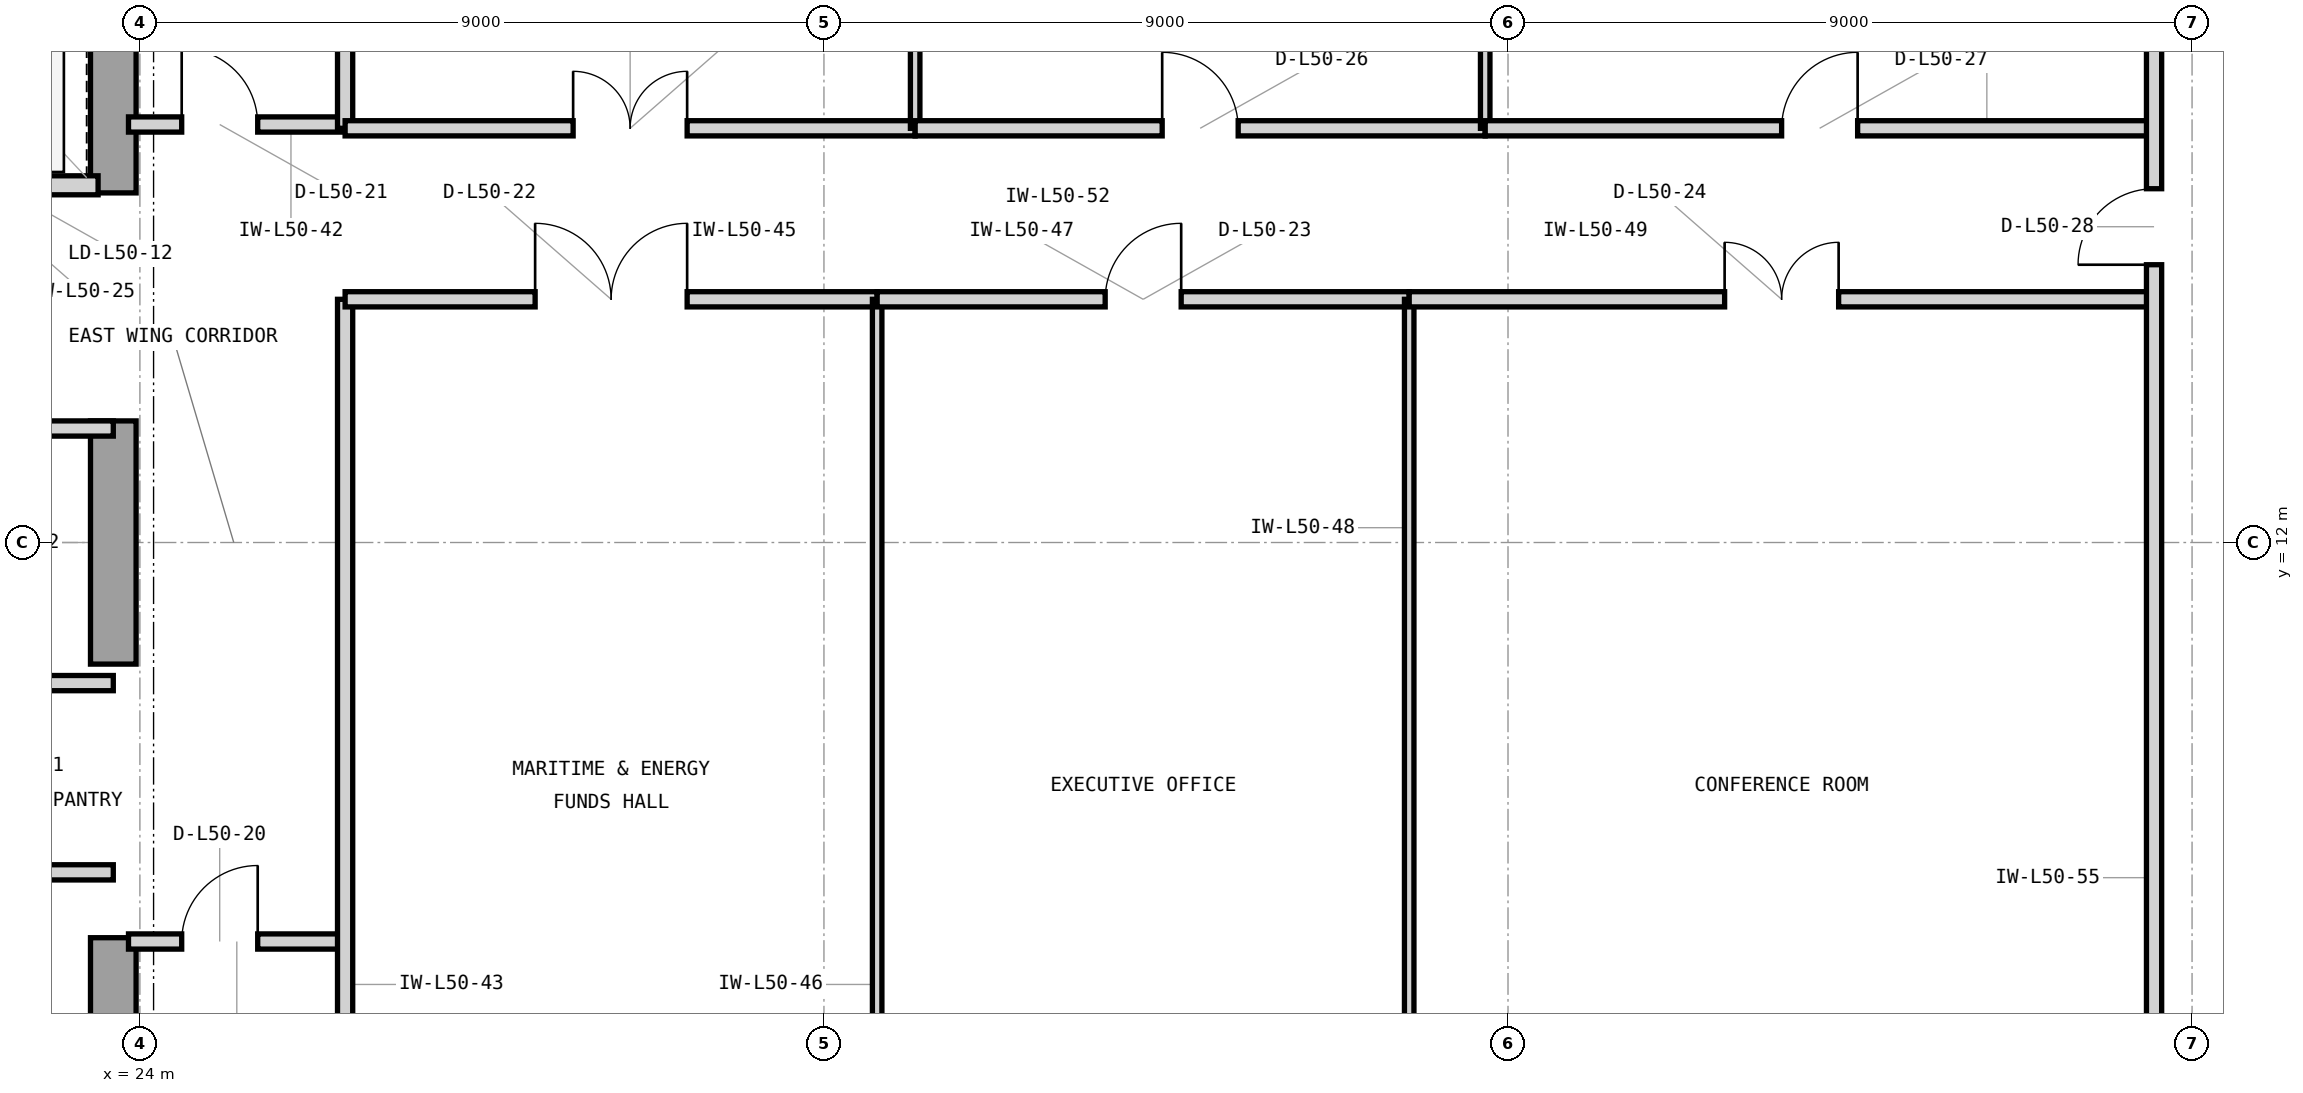
"""IFC4 building model, lengths in metres.
Left out: names, types, materials, properties, quantities, classifications, styles, units other than length and angle.
Written with IfcOpenShell. Run it as: python <this file> out.ifc"""

import sys

from ifc_helpers import new_model, si_unit, direction, frame, frame_2d, origin, place, context, subcontext, project, spatial, rectangle, extrude, element, fill, save


model = new_model("IFC4")
c1 = context("Model", 3, precision=1e-05, world=origin(), true_north=direction((0.0, 1.0)))
c2 = subcontext(c1, "Body", "Model", "MODEL_VIEW")
j1 = project(units=[si_unit("LENGTHUNIT", "METRE"), si_unit("PLANEANGLEUNIT", "RADIAN")], contexts=[c1])
p1 = place(None, origin())
s1 = spatial("IfcSite", under=j1, at=p1, CompositionType="ELEMENT")
p2 = place(p1, origin())
s2 = spatial("IfcBuilding", under=s1, at=p2, CompositionType="ELEMENT")
p3 = place(p2, frame((0.0, 0.0, 207.3)))
s3 = spatial("IfcBuildingStorey", under=s2, at=p3, CompositionType="ELEMENT", Elevation=207.3)
p4 = place(p3, frame((23.65, 3.65, 0.0), z_axis=(0.0, 0.0, 1.0), x_axis=(0.0, 1.0, 0.0)))
e1 = element("IfcWall", 1, at=p4, inside=s3, PredefinedType="SHEAR", context=c2, shape_type="SweptSolid", body=[
    extrude(rectangle(XDim=3.15, YDim=0.6, at=frame_2d((1.575, 0.0))), origin(), (0.0, 0.0, 1.0), 3.9),
])
p5 = place(p3, frame((23.65, 10.4, 0.0), z_axis=(0.0, 0.0, 1.0), x_axis=(0.0, 1.0, 0.0)))
e2 = element("IfcWall", 2, at=p5, inside=s3, PredefinedType="SHEAR", context=c2, shape_type="SweptSolid", body=[
    extrude(rectangle(XDim=3.2, YDim=0.6, at=frame_2d((1.6, 0.0))), origin(), (0.0, 0.0, 1.0), 3.9),
])
p6 = place(p3, frame((23.65, 16.6, 0.0), z_axis=(0.0, 0.0, 1.0), x_axis=(0.0, 1.0, 0.0)))
e3 = element("IfcWall", 3, at=p6, inside=s3, PredefinedType="SHEAR", context=c2, shape_type="SweptSolid", body=[
    extrude(rectangle(XDim=4.05, YDim=0.6, at=frame_2d((2.025, 0.0))), origin(), (0.0, 0.0, 1.0), 3.9),
])
p7 = place(p3, frame((21.05, 16.7, 0.0), z_axis=(0.0, 0.0, 1.0), x_axis=(1.0, 0.0, 0.0)))
e4 = element("IfcWall", 4, at=p7, inside=s3, PredefinedType="PARTITIONING", context=c2, shape_type="SweptSolid", body=[
    extrude(rectangle(XDim=2.4, YDim=0.25, at=frame_2d((1.2, 0.0))), origin(), (0.0, 0.0, 1.0), 3.283),
])
p8 = place(p7, frame((0.52, 0.0, 0.0)))
e5 = element("IfcOpeningElement", 5, at=p8, cuts=e4, PredefinedType="OPENING", context=c2, shape_type="SweptSolid", body=[
    extrude(rectangle(XDim=1.15, YDim=2.25, at=frame_2d((0.575, 1.125))), frame((0.0, 0.135, 0.0), z_axis=(0.0, -1.0, 0.0), x_axis=(1.0, 0.0, 0.0)), (0.0, 0.0, 1.0), 0.27),
])
p9 = place(p3, frame((20.8, 7.66, 0.0), z_axis=(0.0, 0.0, 1.0), x_axis=(1.0, 0.0, 0.0)))
e6 = element("IfcWall", 6, at=p9, inside=s3, PredefinedType="PARTITIONING", context=c2, shape_type="SweptSolid", body=[
    extrude(rectangle(XDim=2.85, YDim=0.2, at=frame_2d((1.425, 0.0))), origin(), (0.0, 0.0, 1.0), 3.69),
])
p10 = place(p9, frame((0.95, 0.0, 0.0)))
e7 = element("IfcOpeningElement", 7, at=p10, cuts=e6, PredefinedType="OPENING", context=c2, shape_type="SweptSolid", body=[
    extrude(rectangle(XDim=0.95, YDim=2.1, at=frame_2d((0.475, 1.05))), frame((0.0, 0.11, 0.0), z_axis=(0.0, -1.0, 0.0), x_axis=(1.0, 0.0, 0.0)), (0.0, 0.0, 1.0), 0.22),
])
p11 = place(p3, frame((14.825, 10.15, 0.0), z_axis=(0.0, 0.0, 1.0), x_axis=(1.0, 0.0, 0.0)))
e8 = element("IfcWall", 8, at=p11, inside=s3, PredefinedType="PARTITIONING", context=c2, shape_type="SweptSolid", body=[
    extrude(rectangle(XDim=8.825, YDim=0.2, at=frame_2d((4.413, 0.0))), origin(), (0.0, 0.0, 1.0), 3.69),
])
p12 = place(p3, frame((18.5, 13.5, 0.0), z_axis=(0.0, 0.0, 1.0), x_axis=(1.0, 0.0, 0.0)))
e9 = element("IfcWall", 9, at=p12, inside=s3, PredefinedType="PARTITIONING", context=c2, shape_type="SweptSolid", body=[
    extrude(rectangle(XDim=5.15, YDim=0.2, at=frame_2d((2.575, 0.0))), origin(), (0.0, 0.0, 1.0), 3.283),
])
p13 = place(p12, frame((2.1, 0.0, 0.0)))
e10 = element("IfcOpeningElement", 10, at=p13, cuts=e9, PredefinedType="OPENING", context=c2, shape_type="SweptSolid", body=[
    extrude(rectangle(XDim=0.95, YDim=2.1, at=frame_2d((0.475, 1.05))), frame((0.0, 0.11, 0.0), z_axis=(0.0, -1.0, 0.0), x_axis=(1.0, 0.0, 0.0)), (0.0, 0.0, 1.0), 0.22),
])
p14 = place(p3, frame((23.85, 6.75, 0.0), z_axis=(0.0, 0.0, 1.0), x_axis=(1.0, 0.0, 0.0)))
e11 = element("IfcWall", 11, at=p14, inside=s3, PredefinedType="PARTITIONING", context=c2, shape_type="SweptSolid", body=[
    extrude(rectangle(XDim=2.85, YDim=0.2, at=frame_2d((1.425, 0.0))), origin(), (0.0, 0.0, 1.0), 3.69),
])
p15 = place(p14, frame((0.7, 0.0, 0.0)))
e12 = element("IfcOpeningElement", 12, at=p15, cuts=e11, PredefinedType="OPENING", context=c2, shape_type="SweptSolid", body=[
    extrude(rectangle(XDim=1.0, YDim=2.15, at=frame_2d((0.5, 1.075))), frame((0.0, 0.11, 0.0), z_axis=(0.0, -1.0, 0.0), x_axis=(1.0, 0.0, 0.0)), (0.0, 0.0, 1.0), 0.22),
])
p16 = place(p3, frame((23.85, 17.5, 0.0), z_axis=(0.0, 0.0, 1.0), x_axis=(1.0, 0.0, 0.0)))
e13 = element("IfcWall", 13, at=p16, inside=s3, PredefinedType="PARTITIONING", context=c2, shape_type="SweptSolid", body=[
    extrude(rectangle(XDim=2.85, YDim=0.2, at=frame_2d((1.425, 0.0))), origin(), (0.0, 0.0, 1.0), 3.69),
])
p17 = place(p16, frame((0.7, 0.0, 0.0)))
e14 = element("IfcOpeningElement", 14, at=p17, cuts=e13, PredefinedType="OPENING", context=c2, shape_type="SweptSolid", body=[
    extrude(rectangle(XDim=1.0, YDim=2.15, at=frame_2d((0.5, 1.075))), frame((0.0, 0.11, 0.0), z_axis=(0.0, -1.0, 0.0), x_axis=(1.0, 0.0, 0.0)), (0.0, 0.0, 1.0), 0.22),
])
p18 = place(p3, frame((26.7, 3.18, 0.0), z_axis=(0.0, 0.0, 1.0), x_axis=(0.0, 1.0, 0.0)))
e15 = element("IfcWall", 15, at=p18, inside=s3, PredefinedType="PARTITIONING", context=c2, shape_type="SweptSolid", body=[
    extrude(rectangle(XDim=12.02, YDim=0.2, at=frame_2d((6.01, 0.0))), origin(), (0.0, 0.0, 1.0), 3.69),
])
p19 = place(p3, frame((26.7, 17.45, 0.0), z_axis=(0.0, 0.0, 1.0), x_axis=(0.0, 1.0, 0.0)))
e16 = element("IfcWall", 16, at=p19, inside=s3, PredefinedType="PARTITIONING", context=c2, shape_type="SweptSolid", body=[
    extrude(rectangle(XDim=3.37, YDim=0.2, at=frame_2d((1.685, 0.0))), origin(), (0.0, 0.0, 1.0), 3.69),
])
p20 = place(p3, frame((26.7, 15.2, 0.0), z_axis=(0.0, 0.0, 1.0), x_axis=(1.0, 0.0, 0.0)))
e17 = element("IfcWall", 17, at=p20, inside=s3, PredefinedType="PARTITIONING", context=c2, shape_type="SweptSolid", body=[
    extrude(rectangle(XDim=7.0, YDim=0.2, at=frame_2d((3.5, 0.0))), origin(), (0.0, 0.0, 1.0), 3.69),
])
p21 = place(p20, frame((2.5, 0.0, 0.0)))
e18 = element("IfcOpeningElement", 18, at=p21, cuts=e17, PredefinedType="OPENING", context=c2, shape_type="SweptSolid", body=[
    extrude(rectangle(XDim=2.0, YDim=2.5, at=frame_2d((1.0, 1.25))), frame((0.0, 0.11, 0.0), z_axis=(0.0, -1.0, 0.0), x_axis=(1.0, 0.0, 0.0)), (0.0, 0.0, 1.0), 0.22),
])
p22 = place(p3, frame((33.7, 3.18, 0.0), z_axis=(0.0, 0.0, 1.0), x_axis=(0.0, 1.0, 0.0)))
e19 = element("IfcWall", 19, at=p22, inside=s3, PredefinedType="PARTITIONING", context=c2, shape_type="SweptSolid", body=[
    extrude(rectangle(XDim=12.02, YDim=0.125, at=frame_2d((6.01, 0.0))), origin(), (0.0, 0.0, 1.0), 3.69),
])
p23 = place(p3, frame((33.7, 15.2, 0.0), z_axis=(0.0, 0.0, 1.0), x_axis=(1.0, 0.0, 0.0)))
e20 = element("IfcWall", 20, at=p23, inside=s3, PredefinedType="PARTITIONING", context=c2, shape_type="SweptSolid", body=[
    extrude(rectangle(XDim=7.0, YDim=0.2, at=frame_2d((3.5, 0.0))), origin(), (0.0, 0.0, 1.0), 3.69),
])
p24 = place(p23, frame((3.0, 0.0, 0.0)))
e21 = element("IfcOpeningElement", 21, at=p24, cuts=e20, PredefinedType="OPENING", context=c2, shape_type="SweptSolid", body=[
    extrude(rectangle(XDim=1.0, YDim=2.15, at=frame_2d((0.5, 1.075))), frame((0.0, 0.11, 0.0), z_axis=(0.0, -1.0, 0.0), x_axis=(1.0, 0.0, 0.0)), (0.0, 0.0, 1.0), 0.22),
])
p25 = place(p3, frame((40.7, 3.18, 0.0), z_axis=(0.0, 0.0, 1.0), x_axis=(0.0, 1.0, 0.0)))
e22 = element("IfcWall", 22, at=p25, inside=s3, PredefinedType="PARTITIONING", context=c2, shape_type="SweptSolid", body=[
    extrude(rectangle(XDim=12.02, YDim=0.125, at=frame_2d((6.01, 0.0))), origin(), (0.0, 0.0, 1.0), 3.69),
])
p26 = place(p3, frame((40.7, 15.2, 0.0), z_axis=(0.0, 0.0, 1.0), x_axis=(1.0, 0.0, 0.0)))
e23 = element("IfcWall", 23, at=p26, inside=s3, PredefinedType="PARTITIONING", context=c2, shape_type="SweptSolid", body=[
    extrude(rectangle(XDim=9.8, YDim=0.2, at=frame_2d((4.9, 0.0))), origin(), (0.0, 0.0, 1.0), 3.69),
])
p27 = place(p26, frame((4.15, 0.0, 0.0)))
e24 = element("IfcOpeningElement", 24, at=p27, cuts=e23, PredefinedType="OPENING", context=c2, shape_type="SweptSolid", body=[
    extrude(rectangle(XDim=1.5, YDim=2.3, at=frame_2d((0.75, 1.15))), frame((0.0, 0.11, 0.0), z_axis=(0.0, -1.0, 0.0), x_axis=(1.0, 0.0, 0.0)), (0.0, 0.0, 1.0), 0.22),
])
p28 = place(p3, frame((26.7, 17.45, 0.0), z_axis=(0.0, 0.0, 1.0), x_axis=(1.0, 0.0, 0.0)))
e25 = element("IfcWall", 25, at=p28, inside=s3, PredefinedType="PARTITIONING", context=c2, shape_type="SweptSolid", body=[
    extrude(rectangle(XDim=7.5, YDim=0.2, at=frame_2d((3.75, 0.0))), origin(), (0.0, 0.0, 1.0), 3.69),
])
p29 = place(p28, frame((3.0, 0.0, 0.0)))
e26 = element("IfcOpeningElement", 26, at=p29, cuts=e25, PredefinedType="OPENING", context=c2, shape_type="SweptSolid", body=[
    extrude(rectangle(XDim=1.5, YDim=2.3, at=frame_2d((0.75, 1.15))), frame((0.0, 0.11, 0.0), z_axis=(0.0, -1.0, 0.0), x_axis=(1.0, 0.0, 0.0)), (0.0, 0.0, 1.0), 0.22),
])
p30 = place(p3, frame((34.2, 17.45, 0.0), z_axis=(0.0, 0.0, 1.0), x_axis=(0.0, 1.0, 0.0)))
e27 = element("IfcWall", 27, at=p30, inside=s3, PredefinedType="PARTITIONING", context=c2, shape_type="SweptSolid", body=[
    extrude(rectangle(XDim=3.37, YDim=0.125, at=frame_2d((1.685, 0.0))), origin(), (0.0, 0.0, 1.0), 3.69),
])
p31 = place(p3, frame((34.2, 17.45, 0.0), z_axis=(0.0, 0.0, 1.0), x_axis=(1.0, 0.0, 0.0)))
e28 = element("IfcWall", 28, at=p31, inside=s3, PredefinedType="PARTITIONING", context=c2, shape_type="SweptSolid", body=[
    extrude(rectangle(XDim=7.5, YDim=0.2, at=frame_2d((3.75, 0.0))), origin(), (0.0, 0.0, 1.0), 3.69),
])
p32 = place(p31, frame((3.25, 0.0, 0.0)))
e29 = element("IfcOpeningElement", 29, at=p32, cuts=e28, PredefinedType="OPENING", context=c2, shape_type="SweptSolid", body=[
    extrude(rectangle(XDim=1.0, YDim=2.15, at=frame_2d((0.5, 1.075))), frame((0.0, 0.11, 0.0), z_axis=(0.0, -1.0, 0.0), x_axis=(1.0, 0.0, 0.0)), (0.0, 0.0, 1.0), 0.22),
])
p33 = place(p3, frame((41.7, 17.45, 0.0), z_axis=(0.0, 0.0, 1.0), x_axis=(0.0, 1.0, 0.0)))
e30 = element("IfcWall", 30, at=p33, inside=s3, PredefinedType="PARTITIONING", context=c2, shape_type="SweptSolid", body=[
    extrude(rectangle(XDim=3.37, YDim=0.125, at=frame_2d((1.685, 0.0))), origin(), (0.0, 0.0, 1.0), 3.69),
])
p34 = place(p3, frame((41.7, 17.45, 0.0), z_axis=(0.0, 0.0, 1.0), x_axis=(1.0, 0.0, 0.0)))
e31 = element("IfcWall", 31, at=p34, inside=s3, PredefinedType="PARTITIONING", context=c2, shape_type="SweptSolid", body=[
    extrude(rectangle(XDim=8.8, YDim=0.2, at=frame_2d((4.4, 0.0))), origin(), (0.0, 0.0, 1.0), 3.69),
])
p35 = place(p34, frame((3.9, 0.0, 0.0)))
e32 = element("IfcOpeningElement", 32, at=p35, cuts=e31, PredefinedType="OPENING", context=c2, shape_type="SweptSolid", body=[
    extrude(rectangle(XDim=1.0, YDim=2.15, at=frame_2d((0.5, 1.075))), frame((0.0, 0.11, 0.0), z_axis=(0.0, -1.0, 0.0), x_axis=(1.0, 0.0, 0.0)), (0.0, 0.0, 1.0), 0.22),
])
p36 = place(p3, frame((50.5, 3.18, 0.0), z_axis=(0.0, 0.0, 1.0), x_axis=(0.0, 1.0, 0.0)))
e33 = element("IfcWall", 33, at=p36, inside=s3, PredefinedType="PARTITIONING", context=c2, shape_type="SweptSolid", body=[
    extrude(rectangle(XDim=17.64, YDim=0.2, at=frame_2d((8.82, 0.0))), origin(), (0.0, 0.0, 1.0), 3.69),
])
p37 = place(p36, frame((12.475, 0.0, 0.0)))
e34 = element("IfcOpeningElement", 34, at=p37, cuts=e33, PredefinedType="OPENING", context=c2, shape_type="SweptSolid", body=[
    extrude(rectangle(XDim=1.0, YDim=2.15, at=frame_2d((0.5, 1.075))), frame((0.0, 0.11, 0.0), z_axis=(0.0, -1.0, 0.0), x_axis=(1.0, 0.0, 0.0)), (0.0, 0.0, 1.0), 0.22),
])
p38 = place(p15, origin())
e35 = element("IfcDoor", 35, at=p38, inside=s3, OperationType="SINGLE_SWING_RIGHT", PredefinedType="DOOR", context=c2, shape_type="SweptSolid", body=[
    extrude(rectangle(XDim=1.0, YDim=2.15, at=frame_2d((0.5, 1.075))), frame((0.0, 0.025, 0.0), z_axis=(0.0, -1.0, 0.0), x_axis=(1.0, 0.0, 0.0)), (0.0, 0.0, 1.0), 0.05),
])
fill(e12, e35)
p39 = place(p17, origin())
e36 = element("IfcDoor", 36, at=p39, inside=s3, OperationType="SINGLE_SWING_LEFT", PredefinedType="DOOR", context=c2, shape_type="SweptSolid", body=[
    extrude(rectangle(XDim=1.0, YDim=2.15, at=frame_2d((0.5, 1.075))), frame((0.0, 0.025, 0.0), z_axis=(0.0, -1.0, 0.0), x_axis=(1.0, 0.0, 0.0)), (0.0, 0.0, 1.0), 0.05),
])
fill(e14, e36)
p40 = place(p21, origin())
e37 = element("IfcDoor", 37, at=p40, inside=s3, OperationType="DOUBLE_DOOR_SINGLE_SWING", PredefinedType="DOOR", context=c2, shape_type="SweptSolid", body=[
    extrude(rectangle(XDim=2.0, YDim=2.5, at=frame_2d((1.0, 1.25))), frame((0.0, 0.025, 0.0), z_axis=(0.0, -1.0, 0.0), x_axis=(1.0, 0.0, 0.0)), (0.0, 0.0, 1.0), 0.05),
])
fill(e18, e37)
p41 = place(p24, origin())
e38 = element("IfcDoor", 38, at=p41, inside=s3, OperationType="SINGLE_SWING_RIGHT", PredefinedType="DOOR", context=c2, shape_type="SweptSolid", body=[
    extrude(rectangle(XDim=1.0, YDim=2.15, at=frame_2d((0.5, 1.075))), frame((0.0, 0.025, 0.0), z_axis=(0.0, -1.0, 0.0), x_axis=(1.0, 0.0, 0.0)), (0.0, 0.0, 1.0), 0.05),
])
fill(e21, e38)
p42 = place(p27, origin())
e39 = element("IfcDoor", 39, at=p42, inside=s3, OperationType="DOUBLE_DOOR_SINGLE_SWING", PredefinedType="DOOR", context=c2, shape_type="SweptSolid", body=[
    extrude(rectangle(XDim=1.5, YDim=2.3, at=frame_2d((0.75, 1.15))), frame((0.0, 0.025, 0.0), z_axis=(0.0, -1.0, 0.0), x_axis=(1.0, 0.0, 0.0)), (0.0, 0.0, 1.0), 0.05),
])
fill(e24, e39)
p43 = place(p29, origin())
e40 = element("IfcDoor", 40, at=p43, inside=s3, OperationType="DOUBLE_DOOR_SINGLE_SWING", PredefinedType="DOOR", context=c2, shape_type="SweptSolid", body=[
    extrude(rectangle(XDim=1.5, YDim=2.3, at=frame_2d((0.75, 1.15))), frame((0.0, 0.025, 0.0), z_axis=(0.0, -1.0, 0.0), x_axis=(1.0, 0.0, 0.0)), (0.0, 0.0, 1.0), 0.05),
])
fill(e26, e40)
p44 = place(p32, origin())
e41 = element("IfcDoor", 41, at=p44, inside=s3, OperationType="SINGLE_SWING_LEFT", PredefinedType="DOOR", context=c2, shape_type="SweptSolid", body=[
    extrude(rectangle(XDim=1.0, YDim=2.15, at=frame_2d((0.5, 1.075))), frame((0.0, 0.025, 0.0), z_axis=(0.0, -1.0, 0.0), x_axis=(1.0, 0.0, 0.0)), (0.0, 0.0, 1.0), 0.05),
])
fill(e29, e41)
p45 = place(p35, origin())
e42 = element("IfcDoor", 42, at=p45, inside=s3, OperationType="SINGLE_SWING_RIGHT", PredefinedType="DOOR", context=c2, shape_type="SweptSolid", body=[
    extrude(rectangle(XDim=1.0, YDim=2.15, at=frame_2d((0.5, 1.075))), frame((0.0, 0.025, 0.0), z_axis=(0.0, -1.0, 0.0), x_axis=(1.0, 0.0, 0.0)), (0.0, 0.0, 1.0), 0.05),
])
fill(e32, e42)
p46 = place(p37, origin())
e43 = element("IfcDoor", 43, at=p46, inside=s3, OperationType="SINGLE_SWING_LEFT", PredefinedType="DOOR", context=c2, shape_type="SweptSolid", body=[
    extrude(rectangle(XDim=1.0, YDim=2.15, at=frame_2d((0.5, 1.075))), frame((0.0, 0.025, 0.0), z_axis=(0.0, -1.0, 0.0), x_axis=(1.0, 0.0, 0.0)), (0.0, 0.0, 1.0), 0.05),
])
fill(e34, e43)
save(model, sys.argv[1])
